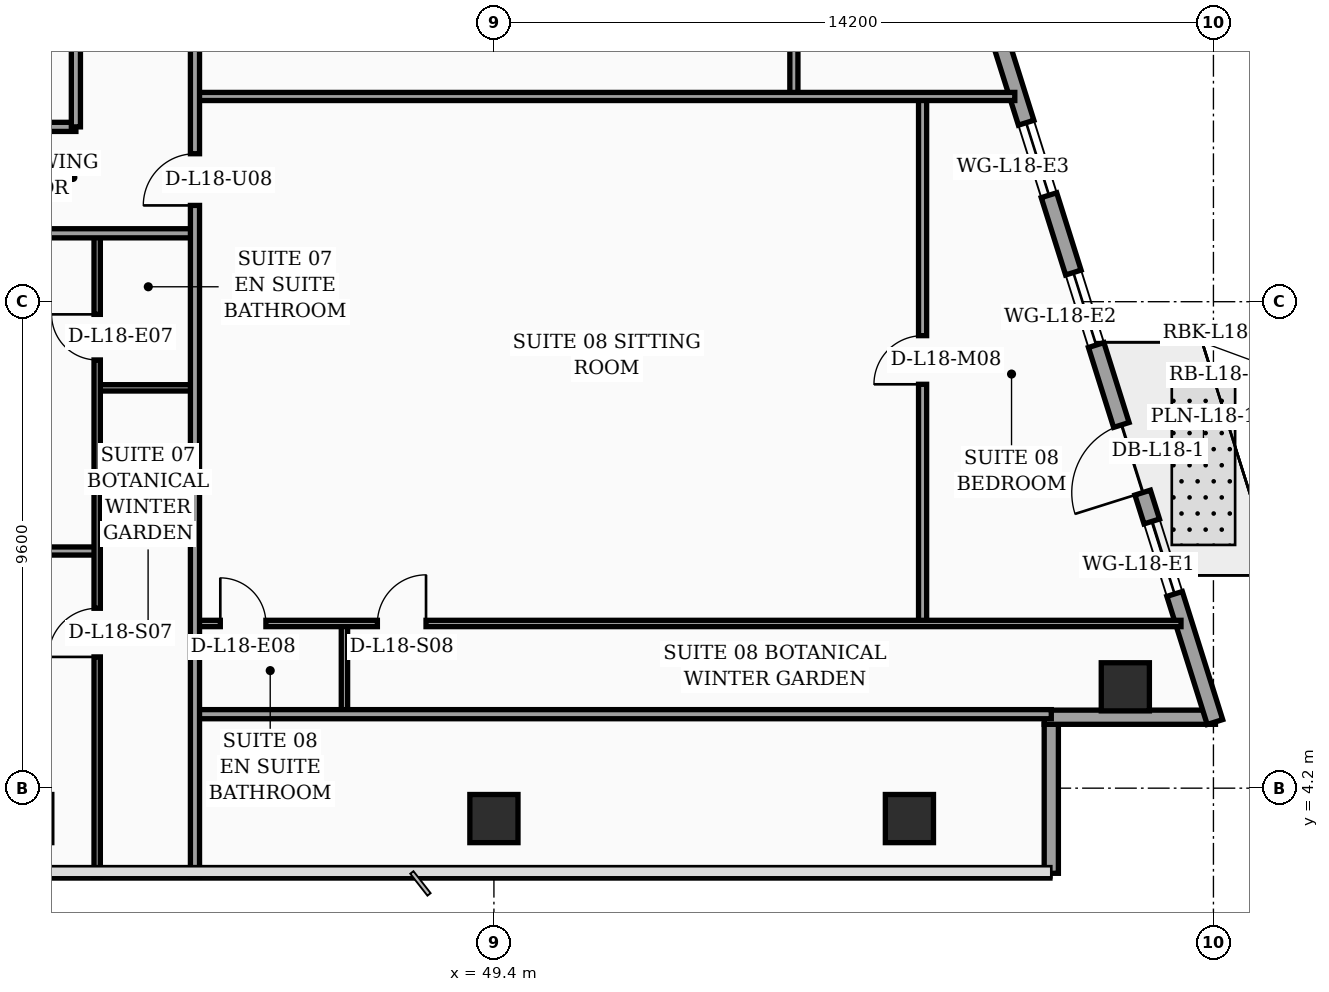
"""IFC4 building model, lengths in metres.
Left out: names, types, materials, properties, quantities, classifications, styles, units other than length and angle.
Written with IfcOpenShell. Run it as: python <this file> out.ifc"""

import sys

from ifc_helpers import new_model, si_unit, direction, frame, frame_2d, origin, origin_2d, place, context, subcontext, project, spatial, rectangle, hollow_rectangle, extrude, element, fill, save


model = new_model("IFC4")
c1 = context("Model", 3, precision=1e-05, world=origin(), true_north=direction((0.0, 1.0)))
c2 = subcontext(c1, "Body", "Model", "MODEL_VIEW")
j1 = project(units=[si_unit("LENGTHUNIT", "METRE"), si_unit("PLANEANGLEUNIT", "RADIAN")], contexts=[c1])
p1 = place(None, origin())
s1 = spatial("IfcSite", under=j1, at=p1, CompositionType="ELEMENT")
p2 = place(p1, origin())
s2 = spatial("IfcBuilding", under=s1, at=p2, CompositionType="ELEMENT")
p3 = place(p2, frame((0.0, 0.0, 77.4)))
s3 = spatial("IfcBuildingStorey", under=s2, at=p3, CompositionType="ELEMENT", Elevation=77.4)
for number, where, z_axis, x_axis in (
    (1, (49.4, 3.6, 0.0), (0.0, 0.0, 1.0), (1.0, 0.0, 0.0)),
    (2, (57.6, 3.6, 0.0), (0.0, 0.0, 1.0), (1.0, 0.0, 0.0)),
    (3, (61.861, 6.2, 0.0), (0.0, 0.0, 1.0), (1.0, 0.0, 0.0)),
):
    element("IfcColumn", number, at=place(p3, frame(where, z_axis=z_axis, x_axis=x_axis)), inside=s3, PredefinedType="COLUMN", context=c2, shape_type="SweptSolid", body=[
        extrude(hollow_rectangle(XDim=0.95, YDim=0.95, WallThickness=0.04, at=origin_2d()), origin(), (0.0, 0.0, 1.0), 3.56),
    ])
p4 = place(p3, frame((60.4, 2.52, 0.0), z_axis=(0.0, 0.0, 1.0), x_axis=(0.0, 1.0, 0.0)))
e4 = element("IfcWall", 4, at=p4, inside=s3, PredefinedType="SOLIDWALL", context=c2, shape_type="SweptSolid", body=[
    extrude(rectangle(XDim=2.94, YDim=0.28, at=frame_2d((1.47, 0.0))), origin(), (0.0, 0.0, 1.0), 3.04),
])
p5 = place(p3, frame((60.26, 5.6, 0.0), z_axis=(0.0, 0.0, 1.0), x_axis=(1.0, 0.0, 0.0)))
e5 = element("IfcWall", 5, at=p5, inside=s3, PredefinedType="SOLIDWALL", context=c2, shape_type="SweptSolid", body=[
    extrude(rectangle(XDim=3.38, YDim=0.28, at=frame_2d((1.69, 0.0))), origin(), (0.0, 0.0, 1.0), 3.04),
])
p6 = place(p3, frame((63.63, 5.505, 0.0), z_axis=(0.0, 0.0, 1.0), x_axis=(-0.300501856448, 0.953781229775, 0.0)))
e6 = element("IfcWall", 6, at=p6, inside=s3, PredefinedType="SOLIDWALL", context=c2, shape_type="SweptSolid", body=[
    extrude(rectangle(XDim=30.814, YDim=0.32, at=frame_2d((15.407, 0.0))), origin(), (0.0, 0.0, 1.0), 3.56),
])
p7 = place(p6, frame((4.747, 0.0, 0.0)))
e7 = element("IfcOpeningElement", 7, at=p7, cuts=e6, PredefinedType="OPENING", context=c2, shape_type="SweptSolid", body=[
    extrude(rectangle(XDim=1.4, YDim=2.25, at=frame_2d((0.7, 1.125))), frame((0.0, 0.17, 0.0), z_axis=(0.0, -1.0, 0.0), x_axis=(1.0, 0.0, 0.0)), (0.0, 0.0, 1.0), 0.34),
])
p8 = place(p6, frame((2.65, 0.0, 0.75)))
e8 = element("IfcOpeningElement", 8, at=p8, cuts=e6, PredefinedType="OPENING", context=c2, shape_type="SweptSolid", body=[
    extrude(rectangle(XDim=1.5, YDim=1.6, at=frame_2d((0.75, 0.8))), frame((0.0, 0.17, 0.0), z_axis=(0.0, -1.0, 0.0), x_axis=(1.0, 0.0, 0.0)), (0.0, 0.0, 1.0), 0.34),
])
p9 = place(p6, frame((7.8, 0.0, 0.75)))
e9 = element("IfcOpeningElement", 9, at=p9, cuts=e6, PredefinedType="OPENING", context=c2, shape_type="SweptSolid", body=[
    extrude(rectangle(XDim=1.5, YDim=1.6, at=frame_2d((0.75, 0.8))), frame((0.0, 0.17, 0.0), z_axis=(0.0, -1.0, 0.0), x_axis=(1.0, 0.0, 0.0)), (0.0, 0.0, 1.0), 0.34),
])
p10 = place(p6, frame((10.9, 0.0, 0.75)))
e10 = element("IfcOpeningElement", 10, at=p10, cuts=e6, PredefinedType="OPENING", context=c2, shape_type="SweptSolid", body=[
    extrude(rectangle(XDim=1.5, YDim=1.6, at=frame_2d((0.75, 0.8))), frame((0.0, 0.17, 0.0), z_axis=(0.0, -1.0, 0.0), x_axis=(1.0, 0.0, 0.0)), (0.0, 0.0, 1.0), 0.34),
])
p11 = place(p6, frame((14.0, 0.0, 0.75)))
e11 = element("IfcOpeningElement", 11, at=p11, cuts=e6, PredefinedType="OPENING", context=c2, shape_type="SweptSolid", body=[
    extrude(rectangle(XDim=1.5, YDim=1.6, at=frame_2d((0.75, 0.8))), frame((0.0, 0.17, 0.0), z_axis=(0.0, -1.0, 0.0), x_axis=(1.0, 0.0, 0.0)), (0.0, 0.0, 1.0), 0.34),
])
p12 = place(p6, frame((17.1, 0.0, 0.75)))
e12 = element("IfcOpeningElement", 12, at=p12, cuts=e6, PredefinedType="OPENING", context=c2, shape_type="SweptSolid", body=[
    extrude(rectangle(XDim=1.5, YDim=1.6, at=frame_2d((0.75, 0.8))), frame((0.0, 0.17, 0.0), z_axis=(0.0, -1.0, 0.0), x_axis=(1.0, 0.0, 0.0)), (0.0, 0.0, 1.0), 0.34),
])
p13 = place(p6, frame((23.3, 0.0, 0.75)))
e13 = element("IfcOpeningElement", 13, at=p13, cuts=e6, PredefinedType="OPENING", context=c2, shape_type="SweptSolid", body=[
    extrude(rectangle(XDim=1.5, YDim=1.6, at=frame_2d((0.75, 0.8))), frame((0.0, 0.17, 0.0), z_axis=(0.0, -1.0, 0.0), x_axis=(1.0, 0.0, 0.0)), (0.0, 0.0, 1.0), 0.34),
])
p14 = place(p6, frame((27.45, 0.0, 0.75)))
e14 = element("IfcOpeningElement", 14, at=p14, cuts=e6, PredefinedType="OPENING", context=c2, shape_type="SweptSolid", body=[
    extrude(rectangle(XDim=1.5, YDim=1.6, at=frame_2d((0.75, 0.8))), frame((0.0, 0.17, 0.0), z_axis=(0.0, -1.0, 0.0), x_axis=(1.0, 0.0, 0.0)), (0.0, 0.0, 1.0), 0.34),
])
p15 = place(p3, frame((41.57, 12.1, 0.0), z_axis=(0.0, 0.0, 1.0), x_axis=(1.0, 0.0, 0.0)))
e15 = element("IfcWall", 15, at=p15, inside=s3, PredefinedType="PARTITIONING", context=c2, shape_type="SweptSolid", body=[
    extrude(rectangle(XDim=1.93, YDim=0.125, at=frame_2d((0.965, 0.0))), origin(), (0.0, 0.0, 1.0), 3.56),
])
p16 = place(p3, frame((37.1, 8.88, 0.0), z_axis=(0.0, 0.0, 1.0), x_axis=(1.0, 0.0, 0.0)))
e16 = element("IfcWall", 16, at=p16, inside=s3, PredefinedType="PARTITIONING", context=c2, shape_type="SweptSolid", body=[
    extrude(rectangle(XDim=4.47, YDim=0.16, at=frame_2d((2.235, 0.0))), origin(), (0.0, 0.0, 1.0), 2.84),
])
p17 = place(p16, frame((1.75, 0.0, 0.0)))
e17 = element("IfcOpeningElement", 17, at=p17, cuts=e16, PredefinedType="OPENING", context=c2, shape_type="SweptSolid", body=[
    extrude(rectangle(XDim=0.96, YDim=2.2, at=frame_2d((0.48, 1.1))), frame((0.0, 0.09, 0.0), z_axis=(0.0, -1.0, 0.0), x_axis=(1.0, 0.0, 0.0)), (0.0, 0.0, 1.0), 0.18),
])
p18 = place(p3, frame((41.57, 2.44, 0.0), z_axis=(0.0, 0.0, 1.0), x_axis=(0.0, 1.0, 0.0)))
e18 = element("IfcWall", 18, at=p18, inside=s3, PredefinedType="PARTITIONING", context=c2, shape_type="SweptSolid", body=[
    extrude(rectangle(XDim=12.71, YDim=0.125, at=frame_2d((6.355, 0.0))), origin(), (0.0, 0.0, 1.0), 3.04),
])
p19 = place(p18, frame((4.35, 0.0, 0.0)))
e19 = element("IfcOpeningElement", 19, at=p19, cuts=e18, PredefinedType="OPENING", context=c2, shape_type="SweptSolid", body=[
    extrude(rectangle(XDim=0.96, YDim=2.2, at=frame_2d((0.48, 1.1))), frame((0.0, 0.073, 0.0), z_axis=(0.0, -1.0, 0.0), x_axis=(1.0, 0.0, 0.0)), (0.0, 0.0, 1.0), 0.145),
])
p20 = place(p18, frame((10.21, 0.0, 0.0)))
e20 = element("IfcOpeningElement", 20, at=p20, cuts=e18, PredefinedType="OPENING", context=c2, shape_type="SweptSolid", body=[
    extrude(rectangle(XDim=0.9, YDim=2.15, at=frame_2d((0.45, 1.075))), frame((0.0, 0.073, 0.0), z_axis=(0.0, -1.0, 0.0), x_axis=(1.0, 0.0, 0.0)), (0.0, 0.0, 1.0), 0.145),
])
p21 = place(p3, frame((32.4, 15.15, 0.0), z_axis=(0.0, 0.0, 1.0), x_axis=(1.0, 0.0, 0.0)))
e21 = element("IfcWall", 21, at=p21, inside=s3, PredefinedType="PARTITIONING", context=c2, shape_type="SweptSolid", body=[
    extrude(rectangle(XDim=11.1, YDim=0.18, at=frame_2d((5.55, 0.0))), origin(), (0.0, 0.0, 1.0), 2.84),
])
p22 = place(p21, frame((0.98, 0.0, 0.0)))
e22 = element("IfcOpeningElement", 22, at=p22, cuts=e21, PredefinedType="OPENING", context=c2, shape_type="SweptSolid", body=[
    extrude(rectangle(XDim=1.02, YDim=2.2, at=frame_2d((0.51, 1.1))), frame((0.0, 0.1, 0.0), z_axis=(0.0, -1.0, 0.0), x_axis=(1.0, 0.0, 0.0)), (0.0, 0.0, 1.0), 0.2),
])
p23 = place(p21, frame((6.43, 0.0, 0.0)))
e23 = element("IfcOpeningElement", 23, at=p23, cuts=e21, PredefinedType="OPENING", context=c2, shape_type="SweptSolid", body=[
    extrude(rectangle(XDim=1.02, YDim=2.2, at=frame_2d((0.51, 1.1))), frame((0.0, 0.1, 0.0), z_axis=(0.0, -1.0, 0.0), x_axis=(1.0, 0.0, 0.0)), (0.0, 0.0, 1.0), 0.2),
])
p24 = place(p3, frame((21.5, 17.25, 0.0), z_axis=(0.0, 0.0, 1.0), x_axis=(1.0, 0.0, 0.0)))
e24 = element("IfcWall", 24, at=p24, inside=s3, PredefinedType="PARTITIONING", context=c2, shape_type="SweptSolid", body=[
    extrude(rectangle(XDim=19.65, YDim=0.18, at=frame_2d((9.825, 0.0))), origin(), (0.0, 0.0, 1.0), 2.84),
])
p25 = place(p24, frame((0.95, 0.0, 0.0)))
e25 = element("IfcOpeningElement", 25, at=p25, cuts=e24, PredefinedType="OPENING", context=c2, shape_type="SweptSolid", body=[
    extrude(rectangle(XDim=1.02, YDim=2.2, at=frame_2d((0.51, 1.1))), frame((0.0, 0.1, 0.0), z_axis=(0.0, -1.0, 0.0), x_axis=(1.0, 0.0, 0.0)), (0.0, 0.0, 1.0), 0.2),
])
p26 = place(p24, frame((7.47, 0.0, 0.0)))
e26 = element("IfcOpeningElement", 26, at=p26, cuts=e24, PredefinedType="OPENING", context=c2, shape_type="SweptSolid", body=[
    extrude(rectangle(XDim=1.02, YDim=2.2, at=frame_2d((0.51, 1.1))), frame((0.0, 0.1, 0.0), z_axis=(0.0, -1.0, 0.0), x_axis=(1.0, 0.0, 0.0)), (0.0, 0.0, 1.0), 0.2),
])
p27 = place(p24, frame((13.98, 0.0, 0.0)))
e27 = element("IfcOpeningElement", 27, at=p27, cuts=e24, PredefinedType="OPENING", context=c2, shape_type="SweptSolid", body=[
    extrude(rectangle(XDim=1.02, YDim=2.2, at=frame_2d((0.51, 1.1))), frame((0.0, 0.1, 0.0), z_axis=(0.0, -1.0, 0.0), x_axis=(1.0, 0.0, 0.0)), (0.0, 0.0, 1.0), 0.2),
])
p28 = place(p3, frame((41.15, 17.25, 0.0), z_axis=(0.0, 0.0, 1.0), x_axis=(0.0, 1.0, 0.0)))
e28 = element("IfcWall", 28, at=p28, inside=s3, PredefinedType="PARTITIONING", context=c2, shape_type="SweptSolid", body=[
    extrude(rectangle(XDim=16.46, YDim=0.18, at=frame_2d((8.23, 0.0))), origin(), (0.0, 0.0, 1.0), 2.84),
])
p29 = place(p3, frame((46.45, 5.66, 0.0), z_axis=(0.0, 0.0, 1.0), x_axis=(0.0, 1.0, 0.0)))
e29 = element("IfcWall", 29, at=p29, inside=s3, PredefinedType="PARTITIONING", context=c2, shape_type="SweptSolid", body=[
    extrude(rectangle(XDim=1.79, YDim=0.125, at=frame_2d((0.895, 0.0))), origin(), (0.0, 0.0, 1.0), 3.56),
])
p30 = place(p3, frame((57.86, 7.45, 0.0), z_axis=(0.0, 0.0, 1.0), x_axis=(0.0, 1.0, 0.0)))
e30 = element("IfcWall", 30, at=p30, inside=s3, PredefinedType="PARTITIONING", context=c2, shape_type="SweptSolid", body=[
    extrude(rectangle(XDim=10.4, YDim=0.16, at=frame_2d((5.2, 0.0))), origin(), (0.0, 0.0, 1.0), 3.04),
])
p31 = place(p30, frame((4.72, 0.0, 0.0)))
e31 = element("IfcOpeningElement", 31, at=p31, cuts=e30, PredefinedType="OPENING", context=c2, shape_type="SweptSolid", body=[
    extrude(rectangle(XDim=0.96, YDim=2.2, at=frame_2d((0.48, 1.1))), frame((0.0, 0.09, 0.0), z_axis=(0.0, -1.0, 0.0), x_axis=(1.0, 0.0, 0.0)), (0.0, 0.0, 1.0), 0.18),
])
p32 = place(p3, frame((43.5, 7.45, 0.0), z_axis=(0.0, 0.0, 1.0), x_axis=(1.0, 0.0, 0.0)))
e32 = element("IfcWall", 32, at=p32, inside=s3, PredefinedType="PARTITIONING", context=c2, shape_type="SweptSolid", body=[
    extrude(rectangle(XDim=19.46, YDim=0.125, at=frame_2d((9.73, 0.0))), origin(), (0.0, 0.0, 1.0), 2.84),
])
p33 = place(p32, frame((0.5, 0.0, 0.0)))
e33 = element("IfcOpeningElement", 33, at=p33, cuts=e32, PredefinedType="OPENING", context=c2, shape_type="SweptSolid", body=[
    extrude(rectangle(XDim=0.9, YDim=2.15, at=frame_2d((0.45, 1.075))), frame((0.0, 0.073, 0.0), z_axis=(0.0, -1.0, 0.0), x_axis=(1.0, 0.0, 0.0)), (0.0, 0.0, 1.0), 0.145),
])
p34 = place(p32, frame((3.6, 0.0, 0.0)))
e34 = element("IfcOpeningElement", 34, at=p34, cuts=e32, PredefinedType="OPENING", context=c2, shape_type="SweptSolid", body=[
    extrude(rectangle(XDim=0.96, YDim=2.2, at=frame_2d((0.48, 1.1))), frame((0.0, 0.073, 0.0), z_axis=(0.0, -1.0, 0.0), x_axis=(1.0, 0.0, 0.0)), (0.0, 0.0, 1.0), 0.145),
])
p35 = place(p3, frame((43.5, 5.66, 0.0), z_axis=(0.0, 0.0, 1.0), x_axis=(1.0, 0.0, 0.0)))
e35 = element("IfcWall", 35, at=p35, inside=s3, PredefinedType="PARTITIONING", context=c2, shape_type="SweptSolid", body=[
    extrude(rectangle(XDim=16.9, YDim=0.18, at=frame_2d((8.45, 0.0))), origin(), (0.0, 0.0, 1.0), 2.84),
])
p36 = place(p3, frame((55.32, 17.85, 0.0), z_axis=(0.0, 0.0, 1.0), x_axis=(0.0, 1.0, 0.0)))
e36 = element("IfcWall", 36, at=p36, inside=s3, PredefinedType="PARTITIONING", context=c2, shape_type="SweptSolid", body=[
    extrude(rectangle(XDim=5.74, YDim=0.16, at=frame_2d((2.87, 0.0))), origin(), (0.0, 0.0, 1.0), 2.84),
])
p37 = place(p36, frame((2.39, 0.0, 0.0)))
e37 = element("IfcOpeningElement", 37, at=p37, cuts=e36, PredefinedType="OPENING", context=c2, shape_type="SweptSolid", body=[
    extrude(rectangle(XDim=0.96, YDim=2.2, at=frame_2d((0.48, 1.1))), frame((0.0, 0.09, 0.0), z_axis=(0.0, -1.0, 0.0), x_axis=(1.0, 0.0, 0.0)), (0.0, 0.0, 1.0), 0.18),
])
p38 = place(p3, frame((43.5, 17.85, 0.0), z_axis=(0.0, 0.0, 1.0), x_axis=(1.0, 0.0, 0.0)))
e38 = element("IfcWall", 38, at=p38, inside=s3, PredefinedType="PARTITIONING", context=c2, shape_type="SweptSolid", body=[
    extrude(rectangle(XDim=16.18, YDim=0.16, at=frame_2d((8.09, 0.0))), origin(), (0.0, 0.0, 1.0), 2.84),
])
p39 = place(p3, frame((43.5, 2.44, 0.0), z_axis=(0.0, 0.0, 1.0), x_axis=(0.0, 1.0, 0.0)))
e39 = element("IfcWall", 39, at=p39, inside=s3, PredefinedType="PARTITIONING", context=c2, shape_type="SweptSolid", body=[
    extrude(rectangle(XDim=31.04, YDim=0.18, at=frame_2d((15.52, 0.0))), origin(), (0.0, 0.0, 1.0), 2.84),
])
p40 = place(p39, frame((13.26, 0.0, 0.0)))
e40 = element("IfcOpeningElement", 40, at=p40, cuts=e39, PredefinedType="OPENING", context=c2, shape_type="SweptSolid", body=[
    extrude(rectangle(XDim=1.02, YDim=2.2, at=frame_2d((0.51, 1.1))), frame((0.0, 0.1, 0.0), z_axis=(0.0, -1.0, 0.0), x_axis=(1.0, 0.0, 0.0)), (0.0, 0.0, 1.0), 0.2),
])
p41 = place(p39, frame((17.77, 0.0, 0.0)))
e41 = element("IfcOpeningElement", 41, at=p41, cuts=e39, PredefinedType="OPENING", context=c2, shape_type="SweptSolid", body=[
    extrude(rectangle(XDim=1.02, YDim=2.2, at=frame_2d((0.51, 1.1))), frame((0.0, 0.1, 0.0), z_axis=(0.0, -1.0, 0.0), x_axis=(1.0, 0.0, 0.0)), (0.0, 0.0, 1.0), 0.2),
])
p42 = place(p39, frame((25.58, 0.0, 0.0)))
e42 = element("IfcOpeningElement", 42, at=p42, cuts=e39, PredefinedType="OPENING", context=c2, shape_type="SweptSolid", body=[
    extrude(rectangle(XDim=1.02, YDim=2.2, at=frame_2d((0.51, 1.1))), frame((0.0, 0.1, 0.0), z_axis=(0.0, -1.0, 0.0), x_axis=(1.0, 0.0, 0.0)), (0.0, 0.0, 1.0), 0.2),
])
p43 = place(p7, origin())
e43 = element("IfcDoor", 43, at=p43, inside=s3, OperationType="SINGLE_SWING_LEFT", PredefinedType="DOOR", context=c2, shape_type="SweptSolid", body=[
    extrude(rectangle(XDim=1.4, YDim=2.25, at=frame_2d((0.7, 1.125))), frame((0.0, 0.025, 0.0), z_axis=(0.0, -1.0, 0.0), x_axis=(1.0, 0.0, 0.0)), (0.0, 0.0, 1.0), 0.05),
])
fill(e7, e43)
p44 = place(p8, origin())
e44 = element("IfcWindow", 44, at=p44, inside=s3, PartitioningType="SINGLE_PANEL", PredefinedType="WINDOW", context=c2, shape_type="SweptSolid", body=[
    extrude(rectangle(XDim=1.5, YDim=1.6, at=frame_2d((0.75, 0.8))), frame((0.0, 0.03, 0.0), z_axis=(0.0, -1.0, 0.0), x_axis=(1.0, 0.0, 0.0)), (0.0, 0.0, 1.0), 0.06),
])
fill(e8, e44)
p45 = place(p9, origin())
e45 = element("IfcWindow", 45, at=p45, inside=s3, PartitioningType="SINGLE_PANEL", PredefinedType="WINDOW", context=c2, shape_type="SweptSolid", body=[
    extrude(rectangle(XDim=1.5, YDim=1.6, at=frame_2d((0.75, 0.8))), frame((0.0, 0.03, 0.0), z_axis=(0.0, -1.0, 0.0), x_axis=(1.0, 0.0, 0.0)), (0.0, 0.0, 1.0), 0.06),
])
fill(e9, e45)
p46 = place(p10, origin())
e46 = element("IfcWindow", 46, at=p46, inside=s3, PartitioningType="SINGLE_PANEL", PredefinedType="WINDOW", context=c2, shape_type="SweptSolid", body=[
    extrude(rectangle(XDim=1.5, YDim=1.6, at=frame_2d((0.75, 0.8))), frame((0.0, 0.03, 0.0), z_axis=(0.0, -1.0, 0.0), x_axis=(1.0, 0.0, 0.0)), (0.0, 0.0, 1.0), 0.06),
])
fill(e10, e46)
p47 = place(p19, origin())
e47 = element("IfcDoor", 47, at=p47, inside=s3, OperationType="SINGLE_SWING_LEFT", PredefinedType="DOOR", context=c2, shape_type="SweptSolid", body=[
    extrude(rectangle(XDim=0.96, YDim=2.2, at=frame_2d((0.48, 1.1))), frame((0.0, 0.025, 0.0), z_axis=(0.0, -1.0, 0.0), x_axis=(1.0, 0.0, 0.0)), (0.0, 0.0, 1.0), 0.05),
])
fill(e19, e47)
p48 = place(p20, origin())
e48 = element("IfcDoor", 48, at=p48, inside=s3, OperationType="SINGLE_SWING_RIGHT", PredefinedType="DOOR", context=c2, shape_type="SweptSolid", body=[
    extrude(rectangle(XDim=0.9, YDim=2.15, at=frame_2d((0.45, 1.075))), frame((0.0, 0.025, 0.0), z_axis=(0.0, -1.0, 0.0), x_axis=(1.0, 0.0, 0.0)), (0.0, 0.0, 1.0), 0.05),
])
fill(e20, e48)
p49 = place(p31, origin())
e49 = element("IfcDoor", 49, at=p49, inside=s3, OperationType="SINGLE_SWING_LEFT", PredefinedType="DOOR", context=c2, shape_type="SweptSolid", body=[
    extrude(rectangle(XDim=0.96, YDim=2.2, at=frame_2d((0.48, 1.1))), frame((0.0, 0.025, 0.0), z_axis=(0.0, -1.0, 0.0), x_axis=(1.0, 0.0, 0.0)), (0.0, 0.0, 1.0), 0.05),
])
fill(e31, e49)
p50 = place(p33, origin())
e50 = element("IfcDoor", 50, at=p50, inside=s3, OperationType="SINGLE_SWING_LEFT", PredefinedType="DOOR", context=c2, shape_type="SweptSolid", body=[
    extrude(rectangle(XDim=0.9, YDim=2.15, at=frame_2d((0.45, 1.075))), frame((0.0, 0.025, 0.0), z_axis=(0.0, -1.0, 0.0), x_axis=(1.0, 0.0, 0.0)), (0.0, 0.0, 1.0), 0.05),
])
fill(e33, e50)
p51 = place(p34, origin())
e51 = element("IfcDoor", 51, at=p51, inside=s3, OperationType="SINGLE_SWING_RIGHT", PredefinedType="DOOR", context=c2, shape_type="SweptSolid", body=[
    extrude(rectangle(XDim=0.96, YDim=2.2, at=frame_2d((0.48, 1.1))), frame((0.0, 0.025, 0.0), z_axis=(0.0, -1.0, 0.0), x_axis=(1.0, 0.0, 0.0)), (0.0, 0.0, 1.0), 0.05),
])
fill(e34, e51)
p52 = place(p40, origin())
e52 = element("IfcDoor", 52, at=p52, inside=s3, OperationType="SINGLE_SWING_LEFT", PredefinedType="DOOR", context=c2, shape_type="SweptSolid", body=[
    extrude(rectangle(XDim=1.02, YDim=2.2, at=frame_2d((0.51, 1.1))), frame((0.0, 0.025, 0.0), z_axis=(0.0, -1.0, 0.0), x_axis=(1.0, 0.0, 0.0)), (0.0, 0.0, 1.0), 0.05),
])
fill(e40, e52)
save(model, sys.argv[1])
